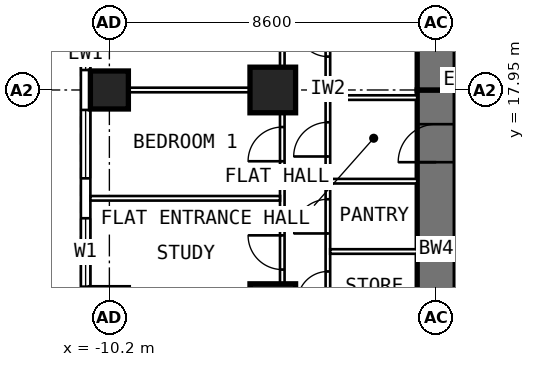
"""IFC4 building model, lengths in metres.
Left out: names, types, materials, properties, quantities, classifications, styles, units other than length and angle.
Written with IfcOpenShell. Run it as: python <this file> out.ifc"""

import sys

from ifc_helpers import new_model, si_unit, direction, frame, frame_2d, origin, origin_2d, place, context, subcontext, project, spatial, rectangle, extrude, element, fill, save


model = new_model("IFC4")
c1 = context("Model", 3, precision=1e-05, world=origin(), true_north=direction((0.0, 1.0)))
c2 = subcontext(c1, "Body", "Model", "MODEL_VIEW")
j1 = project(units=[si_unit("LENGTHUNIT", "METRE"), si_unit("PLANEANGLEUNIT", "RADIAN")], contexts=[c1])
p1 = place(None, origin())
s1 = spatial("IfcSite", under=j1, at=p1, CompositionType="ELEMENT")
p2 = place(p1, origin())
s2 = spatial("IfcBuilding", under=s1, at=p2, CompositionType="ELEMENT")
p3 = place(p2, frame((0.0, 0.0, 50.2)))
s3 = spatial("IfcBuildingStorey", under=s2, at=p3, CompositionType="ELEMENT", Elevation=50.2)
p4 = place(p3, frame((-10.2, 17.95, 0.0), z_axis=(0.0, 0.0, 1.0), x_axis=(0.0, 1.0, 0.0)))
e1 = element("IfcColumn", 1, at=p4, inside=s3, PredefinedType="COLUMN", context=c2, shape_type="SweptSolid", body=[
    extrude(rectangle(XDim=1.0, YDim=1.0, at=origin_2d()), origin(), (0.0, 0.0, 1.0), 3.6),
])
for number, where, z_axis, x_axis in (
    (2, (-5.9, 12.25, 0.0), (0.0, 0.0, 1.0), (0.0, 1.0, 0.0)),
    (3, (-5.9, 17.95, 0.0), (0.0, 0.0, 1.0), (0.0, 1.0, 0.0)),
):
    element("IfcColumn", number, at=place(p3, frame(where, z_axis=z_axis, x_axis=x_axis)), inside=s3, PredefinedType="COLUMN", context=c2, shape_type="SweptSolid", body=[
        extrude(rectangle(XDim=1.2, YDim=1.2, at=origin_2d()), origin(), (0.0, 0.0, 1.0), 3.6),
    ])
p5 = place(p3, frame((-1.6, 9.6, 0.0), z_axis=(0.0, 0.0, 1.0), x_axis=(0.0, 1.0, 0.0)))
e4 = element("IfcWall", 4, at=p5, inside=s3, PredefinedType="SHEAR", context=c2, shape_type="SweptSolid", body=[
    extrude(rectangle(XDim=8.35, YDim=1.0, at=frame_2d((4.175, 0.0))), origin(), (0.0, 0.0, 1.0), 3.6),
])
p6 = place(p5, frame((6.45, 0.0, 0.0)))
e5 = element("IfcOpeningElement", 5, at=p6, cuts=e4, PredefinedType="OPENING", context=c2, shape_type="SweptSolid", body=[
    extrude(rectangle(XDim=1.0, YDim=2.1, at=frame_2d((0.5, 1.05))), frame((0.0, 0.512, 0.0), z_axis=(0.0, -1.0, 0.0), x_axis=(1.0, 0.0, 0.0)), (0.0, 0.0, 1.0), 1.024),
])
p7 = place(p3, frame((-1.6, 17.95, 0.0), z_axis=(0.0, 0.0, 1.0), x_axis=(0.0, 1.0, 0.0)))
e6 = element("IfcWall", 6, at=p7, inside=s3, PredefinedType="SHEAR", context=c2, shape_type="SweptSolid", body=[
    extrude(rectangle(XDim=5.7, YDim=1.0, at=frame_2d((2.85, 0.0))), origin(), (0.0, 0.0, 1.0), 3.6),
])
p8 = place(p3, frame((-10.825, 6.148, 0.0), z_axis=(0.0, 0.0, 1.0), x_axis=(0.0, 1.0, 0.0)))
e7 = element("IfcWall", 7, at=p8, inside=s3, PredefinedType="SOLIDWALL", context=c2, shape_type="SweptSolid", body=[
    extrude(rectangle(XDim=25.487, YDim=0.25, at=frame_2d((12.744, 0.0))), origin(), (0.0, 0.0, 1.0), 3.35),
])
p9 = place(p8, frame((0.927, 0.0, 0.8)))
e8 = element("IfcOpeningElement", 8, at=p9, cuts=e7, PredefinedType="OPENING", context=c2, shape_type="SweptSolid", body=[
    extrude(rectangle(XDim=1.8, YDim=1.8, at=frame_2d((0.9, 0.9))), frame((0.0, 0.137, 0.0), z_axis=(0.0, -1.0, 0.0), x_axis=(1.0, 0.0, 0.0)), (0.0, 0.0, 1.0), 0.274),
])
p10 = place(p8, frame((3.777, 0.0, 0.8)))
e9 = element("IfcOpeningElement", 9, at=p10, cuts=e7, PredefinedType="OPENING", context=c2, shape_type="SweptSolid", body=[
    extrude(rectangle(XDim=1.8, YDim=1.8, at=frame_2d((0.9, 0.9))), frame((0.0, 0.137, 0.0), z_axis=(0.0, -1.0, 0.0), x_axis=(1.0, 0.0, 0.0)), (0.0, 0.0, 1.0), 0.274),
])
p11 = place(p8, frame((6.627, 0.0, 0.8)))
e10 = element("IfcOpeningElement", 10, at=p11, cuts=e7, PredefinedType="OPENING", context=c2, shape_type="SweptSolid", body=[
    extrude(rectangle(XDim=1.8, YDim=1.8, at=frame_2d((0.9, 0.9))), frame((0.0, 0.137, 0.0), z_axis=(0.0, -1.0, 0.0), x_axis=(1.0, 0.0, 0.0)), (0.0, 0.0, 1.0), 0.274),
])
p12 = place(p8, frame((9.477, 0.0, 0.8)))
e11 = element("IfcOpeningElement", 11, at=p12, cuts=e7, PredefinedType="OPENING", context=c2, shape_type="SweptSolid", body=[
    extrude(rectangle(XDim=1.8, YDim=1.8, at=frame_2d((0.9, 0.9))), frame((0.0, 0.137, 0.0), z_axis=(0.0, -1.0, 0.0), x_axis=(1.0, 0.0, 0.0)), (0.0, 0.0, 1.0), 0.274),
])
p13 = place(p8, frame((12.327, 0.0, 0.8)))
e12 = element("IfcOpeningElement", 12, at=p13, cuts=e7, PredefinedType="OPENING", context=c2, shape_type="SweptSolid", body=[
    extrude(rectangle(XDim=1.8, YDim=1.8, at=frame_2d((0.9, 0.9))), frame((0.0, 0.137, 0.0), z_axis=(0.0, -1.0, 0.0), x_axis=(1.0, 0.0, 0.0)), (0.0, 0.0, 1.0), 0.274),
])
p14 = place(p8, frame((15.177, 0.0, 0.8)))
e13 = element("IfcOpeningElement", 13, at=p14, cuts=e7, PredefinedType="OPENING", context=c2, shape_type="SweptSolid", body=[
    extrude(rectangle(XDim=1.8, YDim=1.8, at=frame_2d((0.9, 0.9))), frame((0.0, 0.137, 0.0), z_axis=(0.0, -1.0, 0.0), x_axis=(1.0, 0.0, 0.0)), (0.0, 0.0, 1.0), 0.274),
])
p15 = place(p8, frame((18.027, 0.0, 0.8)))
e14 = element("IfcOpeningElement", 14, at=p15, cuts=e7, PredefinedType="OPENING", context=c2, shape_type="SweptSolid", body=[
    extrude(rectangle(XDim=1.8, YDim=1.8, at=frame_2d((0.9, 0.9))), frame((0.0, 0.137, 0.0), z_axis=(0.0, -1.0, 0.0), x_axis=(1.0, 0.0, 0.0)), (0.0, 0.0, 1.0), 0.274),
])
p16 = place(p8, frame((20.877, 0.0, 0.8)))
e15 = element("IfcOpeningElement", 15, at=p16, cuts=e7, PredefinedType="OPENING", context=c2, shape_type="SweptSolid", body=[
    extrude(rectangle(XDim=1.8, YDim=1.8, at=frame_2d((0.9, 0.9))), frame((0.0, 0.137, 0.0), z_axis=(0.0, -1.0, 0.0), x_axis=(1.0, 0.0, 0.0)), (0.0, 0.0, 1.0), 0.274),
])
p17 = place(p3, frame((-4.45, 10.1, 0.0), z_axis=(0.0, 0.0, 1.0), x_axis=(0.0, 1.0, 0.0)))
e16 = element("IfcWall", 16, at=p17, inside=s3, PredefinedType="PARTITIONING", context=c2, shape_type="SweptSolid", body=[
    extrude(rectangle(XDim=14.65, YDim=0.12, at=frame_2d((7.325, 0.0))), origin(), (0.0, 0.0, 1.0), 3.35),
])
p18 = place(p17, frame((0.375, 0.0, 0.0)))
e17 = element("IfcOpeningElement", 17, at=p18, cuts=e16, PredefinedType="OPENING", context=c2, shape_type="SweptSolid", body=[
    extrude(rectangle(XDim=0.9, YDim=2.1, at=frame_2d((0.45, 1.05))), frame((0.0, 0.072, 0.0), z_axis=(0.0, -1.0, 0.0), x_axis=(1.0, 0.0, 0.0)), (0.0, 0.0, 1.0), 0.144),
])
p19 = place(p17, frame((2.275, 0.0, 0.0)))
e18 = element("IfcOpeningElement", 18, at=p19, cuts=e16, PredefinedType="OPENING", context=c2, shape_type="SweptSolid", body=[
    extrude(rectangle(XDim=0.8, YDim=2.1, at=frame_2d((0.4, 1.05))), frame((0.0, 0.072, 0.0), z_axis=(0.0, -1.0, 0.0), x_axis=(1.0, 0.0, 0.0)), (0.0, 0.0, 1.0), 0.144),
])
p20 = place(p17, frame((4.075, 0.0, 0.0)))
e19 = element("IfcOpeningElement", 19, at=p20, cuts=e16, PredefinedType="OPENING", context=c2, shape_type="SweptSolid", body=[
    extrude(rectangle(XDim=0.9, YDim=2.1, at=frame_2d((0.45, 1.05))), frame((0.0, 0.072, 0.0), z_axis=(0.0, -1.0, 0.0), x_axis=(1.0, 0.0, 0.0)), (0.0, 0.0, 1.0), 0.144),
])
p21 = place(p17, frame((6.1, 0.0, 0.0)))
e20 = element("IfcOpeningElement", 20, at=p21, cuts=e16, PredefinedType="OPENING", context=c2, shape_type="SweptSolid", body=[
    extrude(rectangle(XDim=0.9, YDim=2.1, at=frame_2d((0.45, 1.05))), frame((0.0, 0.072, 0.0), z_axis=(0.0, -1.0, 0.0), x_axis=(1.0, 0.0, 0.0)), (0.0, 0.0, 1.0), 0.144),
])
p22 = place(p17, frame((8.729, 0.0, 0.0)))
e21 = element("IfcOpeningElement", 21, at=p22, cuts=e16, PredefinedType="OPENING", context=c2, shape_type="SweptSolid", body=[
    extrude(rectangle(XDim=0.8, YDim=2.1, at=frame_2d((0.4, 1.05))), frame((0.0, 0.072, 0.0), z_axis=(0.0, -1.0, 0.0), x_axis=(1.0, 0.0, 0.0)), (0.0, 0.0, 1.0), 0.144),
])
p23 = place(p17, frame((11.193, 0.0, 0.0)))
e22 = element("IfcOpeningElement", 22, at=p23, cuts=e16, PredefinedType="OPENING", context=c2, shape_type="SweptSolid", body=[
    extrude(rectangle(XDim=0.8, YDim=2.1, at=frame_2d((0.4, 1.05))), frame((0.0, 0.072, 0.0), z_axis=(0.0, -1.0, 0.0), x_axis=(1.0, 0.0, 0.0)), (0.0, 0.0, 1.0), 0.144),
])
p24 = place(p17, frame((13.114, 0.0, 0.0)))
e23 = element("IfcOpeningElement", 23, at=p24, cuts=e16, PredefinedType="OPENING", context=c2, shape_type="SweptSolid", body=[
    extrude(rectangle(XDim=0.9, YDim=2.1, at=frame_2d((0.45, 1.05))), frame((0.0, 0.072, 0.0), z_axis=(0.0, -1.0, 0.0), x_axis=(1.0, 0.0, 0.0)), (0.0, 0.0, 1.0), 0.144),
])
p25 = place(p3, frame((-5.65, 9.6, 0.0), z_axis=(0.0, 0.0, 1.0), x_axis=(0.0, 1.0, 0.0)))
e24 = element("IfcWall", 24, at=p25, inside=s3, PredefinedType="PARTITIONING", context=c2, shape_type="SweptSolid", body=[
    extrude(rectangle(XDim=15.15, YDim=0.12, at=frame_2d((7.575, 0.0))), origin(), (0.0, 0.0, 1.0), 3.35),
])
p26 = place(p25, frame((1.0, 0.0, 0.0)))
e25 = element("IfcOpeningElement", 25, at=p26, cuts=e24, PredefinedType="OPENING", context=c2, shape_type="SweptSolid", body=[
    extrude(rectangle(XDim=0.9, YDim=2.1, at=frame_2d((0.45, 1.05))), frame((0.0, 0.072, 0.0), z_axis=(0.0, -1.0, 0.0), x_axis=(1.0, 0.0, 0.0)), (0.0, 0.0, 1.0), 0.144),
])
p27 = place(p25, frame((3.625, 0.0, 0.0)))
e26 = element("IfcOpeningElement", 26, at=p27, cuts=e24, PredefinedType="OPENING", context=c2, shape_type="SweptSolid", body=[
    extrude(rectangle(XDim=0.9, YDim=2.1, at=frame_2d((0.45, 1.05))), frame((0.0, 0.072, 0.0), z_axis=(0.0, -1.0, 0.0), x_axis=(1.0, 0.0, 0.0)), (0.0, 0.0, 1.0), 0.144),
])
p28 = place(p25, frame((6.475, 0.0, 0.0)))
e27 = element("IfcOpeningElement", 27, at=p28, cuts=e24, PredefinedType="OPENING", context=c2, shape_type="SweptSolid", body=[
    extrude(rectangle(XDim=0.9, YDim=2.1, at=frame_2d((0.45, 1.05))), frame((0.0, 0.072, 0.0), z_axis=(0.0, -1.0, 0.0), x_axis=(1.0, 0.0, 0.0)), (0.0, 0.0, 1.0), 0.144),
])
p29 = place(p25, frame((10.75, 0.0, 0.0)))
e28 = element("IfcOpeningElement", 28, at=p29, cuts=e24, PredefinedType="OPENING", context=c2, shape_type="SweptSolid", body=[
    extrude(rectangle(XDim=0.9, YDim=2.1, at=frame_2d((0.45, 1.05))), frame((0.0, 0.072, 0.0), z_axis=(0.0, -1.0, 0.0), x_axis=(1.0, 0.0, 0.0)), (0.0, 0.0, 1.0), 0.144),
])
p30 = place(p3, frame((-5.71, 15.1, 0.0), z_axis=(0.0, 0.0, 1.0), x_axis=(-1.0, 0.0, 0.0)))
e29 = element("IfcWall", 29, at=p30, inside=s3, PredefinedType="PARTITIONING", context=c2, shape_type="SweptSolid", body=[
    extrude(rectangle(XDim=4.99, YDim=0.12, at=frame_2d((2.495, 0.0))), origin(), (0.0, 0.0, 1.0), 3.35),
])
p31 = place(p3, frame((-5.71, 17.95, 0.0), z_axis=(0.0, 0.0, 1.0), x_axis=(-1.0, 0.0, 0.0)))
e30 = element("IfcWall", 30, at=p31, inside=s3, PredefinedType="PARTITIONING", context=c2, shape_type="SweptSolid", body=[
    extrude(rectangle(XDim=4.99, YDim=0.12, at=frame_2d((2.495, 0.0))), origin(), (0.0, 0.0, 1.0), 2.45),
])
for number, where, z_axis, x_axis in (
    (31, (-2.1, 13.7, 0.0), (0.0, 0.0, 1.0), (-1.0, 0.0, 0.0)),
    (32, (-2.1, 15.55, 0.0), (0.0, 0.0, 1.0), (-1.0, 0.0, 0.0)),
):
    element("IfcWall", number, at=place(p3, frame(where, z_axis=z_axis, x_axis=x_axis)), inside=s3, PredefinedType="PARTITIONING", context=c2, shape_type="SweptSolid", body=[
        extrude(rectangle(XDim=2.29, YDim=0.12, at=frame_2d((1.145, 0.0))), origin(), (0.0, 0.0, 1.0), 3.35),
    ])
p32 = place(p3, frame((-2.1, 17.75, 0.0), z_axis=(0.0, 0.0, 1.0), x_axis=(-1.0, 0.0, 0.0)))
e33 = element("IfcWall", 33, at=p32, inside=s3, PredefinedType="PARTITIONING", context=c2, shape_type="SweptSolid", body=[
    extrude(rectangle(XDim=2.29, YDim=0.12, at=frame_2d((1.145, 0.0))), origin(), (0.0, 0.0, 1.0), 2.45),
])
p33 = place(p11, origin())
e34 = element("IfcWindow", 34, at=p33, inside=s3, PartitioningType="SINGLE_PANEL", PredefinedType="WINDOW", context=c2, shape_type="SweptSolid", body=[
    extrude(rectangle(XDim=1.8, YDim=1.8, at=frame_2d((0.9, 0.9))), frame((0.0, 0.03, 0.0), z_axis=(0.0, -1.0, 0.0), x_axis=(1.0, 0.0, 0.0)), (0.0, 0.0, 1.0), 0.06),
])
fill(e10, e34)
p34 = place(p12, origin())
e35 = element("IfcWindow", 35, at=p34, inside=s3, PartitioningType="SINGLE_PANEL", PredefinedType="WINDOW", context=c2, shape_type="SweptSolid", body=[
    extrude(rectangle(XDim=1.8, YDim=1.8, at=frame_2d((0.9, 0.9))), frame((0.0, 0.03, 0.0), z_axis=(0.0, -1.0, 0.0), x_axis=(1.0, 0.0, 0.0)), (0.0, 0.0, 1.0), 0.06),
])
fill(e11, e35)
p35 = place(p13, origin())
e36 = element("IfcWindow", 36, at=p35, inside=s3, PartitioningType="SINGLE_PANEL", PredefinedType="WINDOW", context=c2, shape_type="SweptSolid", body=[
    extrude(rectangle(XDim=1.8, YDim=1.8, at=frame_2d((0.9, 0.9))), frame((0.0, 0.03, 0.0), z_axis=(0.0, -1.0, 0.0), x_axis=(1.0, 0.0, 0.0)), (0.0, 0.0, 1.0), 0.06),
])
fill(e12, e36)
p36 = place(p6, origin())
e37 = element("IfcDoor", 37, at=p36, inside=s3, OperationType="SINGLE_SWING_LEFT", PredefinedType="DOOR", context=c2, shape_type="SweptSolid", body=[
    extrude(rectangle(XDim=1.0, YDim=2.1, at=frame_2d((0.5, 1.05))), frame((0.0, 0.25, 0.0), z_axis=(0.0, -1.0, 0.0), x_axis=(1.0, 0.0, 0.0)), (0.0, 0.0, 1.0), 0.5),
])
fill(e5, e37)
p37 = place(p27, origin())
e38 = element("IfcDoor", 38, at=p37, inside=s3, OperationType="SINGLE_SWING_RIGHT", PredefinedType="DOOR", context=c2, shape_type="SweptSolid", body=[
    extrude(rectangle(XDim=0.9, YDim=2.1, at=frame_2d((0.45, 1.05))), frame((0.0, 0.025, 0.0), z_axis=(0.0, -1.0, 0.0), x_axis=(1.0, 0.0, 0.0)), (0.0, 0.0, 1.0), 0.05),
])
fill(e26, e38)
p38 = place(p28, origin())
e39 = element("IfcDoor", 39, at=p38, inside=s3, OperationType="SINGLE_SWING_LEFT", PredefinedType="DOOR", context=c2, shape_type="SweptSolid", body=[
    extrude(rectangle(XDim=0.9, YDim=2.1, at=frame_2d((0.45, 1.05))), frame((0.0, 0.025, 0.0), z_axis=(0.0, -1.0, 0.0), x_axis=(1.0, 0.0, 0.0)), (0.0, 0.0, 1.0), 0.05),
])
fill(e27, e39)
p39 = place(p19, origin())
e40 = element("IfcDoor", 40, at=p39, inside=s3, OperationType="SINGLE_SWING_LEFT", PredefinedType="DOOR", context=c2, shape_type="SweptSolid", body=[
    extrude(rectangle(XDim=0.8, YDim=2.1, at=frame_2d((0.4, 1.05))), frame((0.0, 0.025, 0.0), z_axis=(0.0, -1.0, 0.0), x_axis=(1.0, 0.0, 0.0)), (0.0, 0.0, 1.0), 0.05),
])
fill(e18, e40)
p40 = place(p20, origin())
e41 = element("IfcDoor", 41, at=p40, inside=s3, OperationType="SINGLE_SWING_LEFT", PredefinedType="DOOR", context=c2, shape_type="SweptSolid", body=[
    extrude(rectangle(XDim=0.9, YDim=2.1, at=frame_2d((0.45, 1.05))), frame((0.0, 0.025, 0.0), z_axis=(0.0, -1.0, 0.0), x_axis=(1.0, 0.0, 0.0)), (0.0, 0.0, 1.0), 0.05),
])
fill(e19, e41)
p41 = place(p21, origin())
e42 = element("IfcDoor", 42, at=p41, inside=s3, OperationType="SINGLE_SWING_LEFT", PredefinedType="DOOR", context=c2, shape_type="SweptSolid", body=[
    extrude(rectangle(XDim=0.9, YDim=2.1, at=frame_2d((0.45, 1.05))), frame((0.0, 0.025, 0.0), z_axis=(0.0, -1.0, 0.0), x_axis=(1.0, 0.0, 0.0)), (0.0, 0.0, 1.0), 0.05),
])
fill(e20, e42)
p42 = place(p22, origin())
e43 = element("IfcDoor", 43, at=p42, inside=s3, OperationType="SINGLE_SWING_RIGHT", PredefinedType="DOOR", context=c2, shape_type="SweptSolid", body=[
    extrude(rectangle(XDim=0.8, YDim=2.1, at=frame_2d((0.4, 1.05))), frame((0.0, 0.025, 0.0), z_axis=(0.0, -1.0, 0.0), x_axis=(1.0, 0.0, 0.0)), (0.0, 0.0, 1.0), 0.05),
])
fill(e21, e43)
save(model, sys.argv[1])
